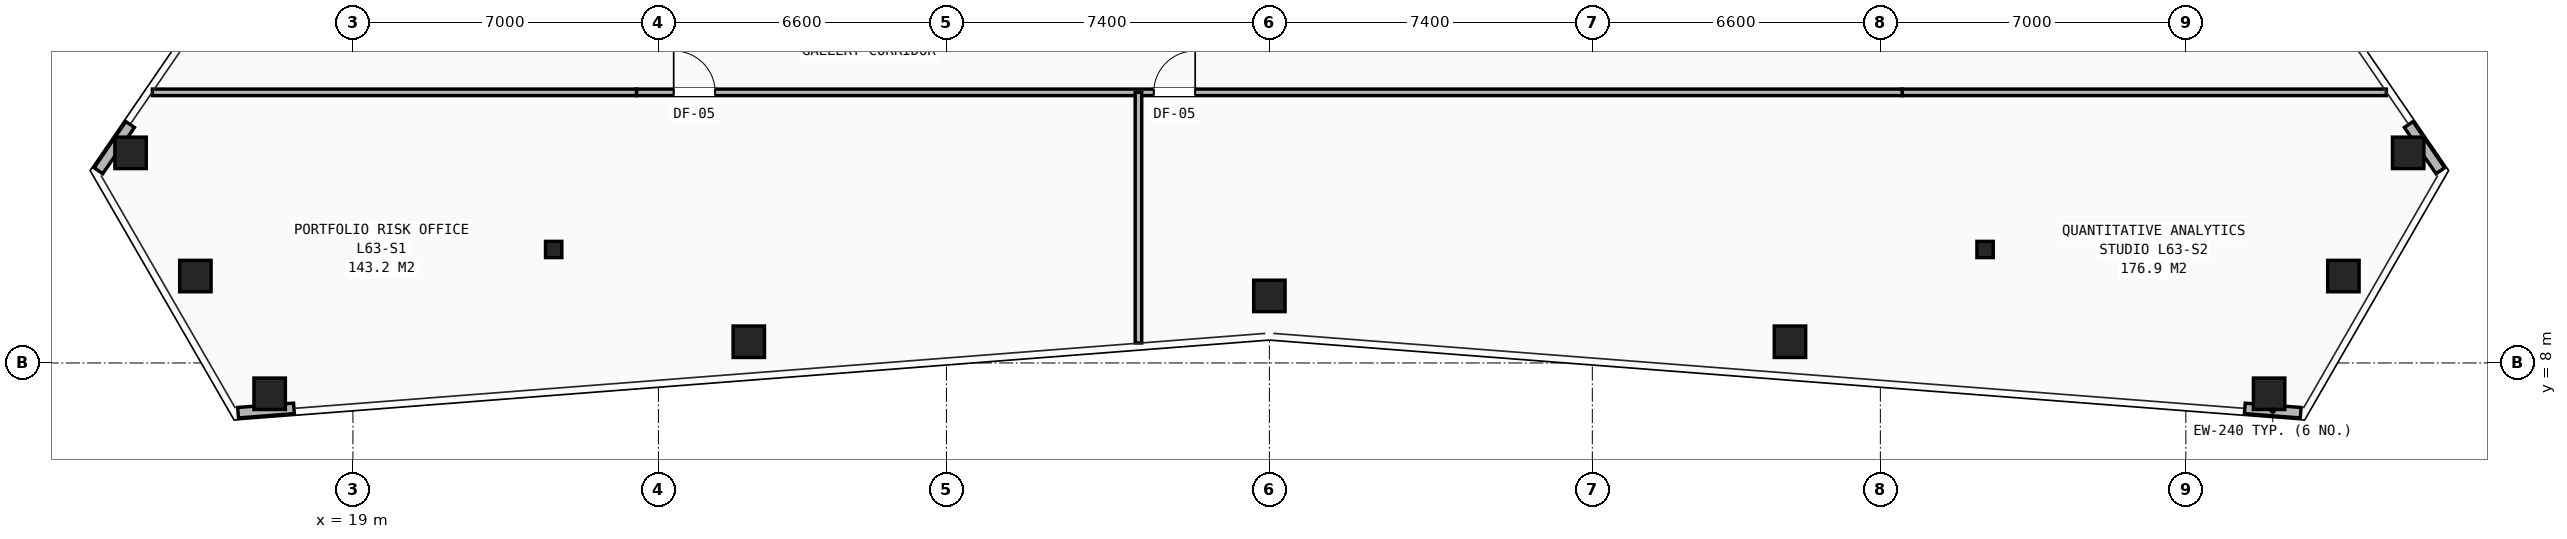
"""IFC4 building model, lengths in metres.
Left out: names, types, materials, properties, quantities, classifications, styles, units other than length and angle.
Written with IfcOpenShell. Run it as: python <this file> out.ifc"""

import sys

from ifc_helpers import new_model, si_unit, direction, frame, frame_2d, origin, origin_2d, place, context, subcontext, project, spatial, rectangle, hollow_rectangle, i_section, extrude, element, fill, save


model = new_model("IFC4")
c1 = context("Model", 3, precision=1e-05, world=origin(), true_north=direction((0.0, 1.0)))
c2 = subcontext(c1, "Body", "Model", "MODEL_VIEW")
j1 = project(units=[si_unit("LENGTHUNIT", "METRE"), si_unit("PLANEANGLEUNIT", "RADIAN")], contexts=[c1])
p1 = place(None, origin())
s1 = spatial("IfcSite", under=j1, at=p1, CompositionType="ELEMENT")
p2 = place(p1, origin())
s2 = spatial("IfcBuilding", under=s1, at=p2, CompositionType="ELEMENT")
p3 = place(p2, frame((0.0, 0.0, 222.4)))
s3 = spatial("IfcBuildingStorey", under=s2, at=p3, CompositionType="ELEMENT", Elevation=222.4)
for number, where, z_axis, x_axis in (
    (1, (23.6, 10.6, 0.0), (0.0, 0.0, 1.0), (1.0, 0.0, 0.0)),
    (2, (56.4, 10.6, 0.0), (0.0, 0.0, 1.0), (1.0, 0.0, 0.0)),
):
    element("IfcColumn", number, at=place(p3, frame(where, z_axis=z_axis, x_axis=x_axis)), inside=s3, PredefinedType="COLUMN", context=c2, shape_type="SweptSolid", body=[
        extrude(i_section(OverallWidth=0.374, OverallDepth=0.372, WebThickness=0.016, FlangeThickness=0.026, at=origin_2d()), origin(), (0.0, 0.0, 1.0), 3.5),
    ])
for number, where, z_axis, x_axis in (
    (3, (13.905, 12.814, 0.0), (0.0, 0.0, 1.0), (1.0, 0.0, 0.0)),
    (4, (15.39, 9.991, 0.0), (0.0, 0.0, 1.0), (1.0, 0.0, 0.0)),
    (5, (17.092, 7.294, 0.0), (0.0, 0.0, 1.0), (1.0, 0.0, 0.0)),
    (6, (28.071, 8.486, 0.0), (0.0, 0.0, 1.0), (1.0, 0.0, 0.0)),
    (7, (40.0, 9.537, 0.0), (0.0, 0.0, 1.0), (1.0, 0.0, 0.0)),
    (8, (51.929, 8.486, 0.0), (0.0, 0.0, 1.0), (1.0, 0.0, 0.0)),
    (9, (62.908, 7.294, 0.0), (0.0, 0.0, 1.0), (1.0, 0.0, 0.0)),
    (10, (64.61, 9.991, 0.0), (0.0, 0.0, 1.0), (1.0, 0.0, 0.0)),
    (11, (66.095, 12.814, 0.0), (0.0, 0.0, 1.0), (1.0, 0.0, 0.0)),
):
    element("IfcColumn", number, at=place(p3, frame(where, z_axis=z_axis, x_axis=x_axis)), inside=s3, PredefinedType="COLUMN", context=c2, shape_type="SweptSolid", body=[
        extrude(hollow_rectangle(XDim=0.72, YDim=0.72, WallThickness=0.05, at=origin_2d()), origin(), (0.0, 0.0, 1.0), 3.5),
    ])
p4 = place(p3, frame((13.894, 13.463, 0.0), z_axis=(0.0, 0.0, 1.0), x_axis=(-0.565269764291, -0.824906111978, 0.0)))
e12 = element("IfcWall", 12, at=p4, inside=s3, PredefinedType="SHEAR", context=c2, shape_type="SweptSolid", body=[
    extrude(rectangle(XDim=1.284, YDim=0.24, at=frame_2d((0.642, 0.0))), origin(), (0.0, 0.0, 1.0), 2.623),
])
for number, where, z_axis, x_axis in (
    (13, (16.368, 6.861, 0.0), (0.0, 0.0, 1.0), (0.997, 0.077, 0.0)),
    (14, (62.351, 6.96, 0.0), (0.0, 0.0, 1.0), (0.997, -0.077, 0.0)),
):
    element("IfcWall", number, at=place(p3, frame(where, z_axis=z_axis, x_axis=x_axis)), inside=s3, PredefinedType="SHEAR", context=c2, shape_type="SweptSolid", body=[
        extrude(rectangle(XDim=1.285, YDim=0.24, at=frame_2d((0.642, 0.0))), origin(), (0.0, 0.0, 1.0), 2.623),
    ])
p5 = place(p3, frame((66.832, 12.404, 0.0), z_axis=(0.0, 0.0, 1.0), x_axis=(-0.565269764291, 0.824906111978, 0.0)))
e15 = element("IfcWall", 15, at=p5, inside=s3, PredefinedType="SHEAR", context=c2, shape_type="SweptSolid", body=[
    extrude(rectangle(XDim=1.284, YDim=0.24, at=frame_2d((0.642, 0.0))), origin(), (0.0, 0.0, 1.0), 2.623),
])
for number, where, z_axis, x_axis in (
    (16, (14.405, 14.2, 0.0), (0.0, 0.0, 1.0), (1.0, 0.0, 0.0)),
    (17, (54.5, 14.2, 0.0), (0.0, 0.0, 1.0), (1.0, 0.0, 0.0)),
):
    element("IfcWall", number, at=place(p3, frame(where, z_axis=z_axis, x_axis=x_axis)), inside=s3, PredefinedType="PARTITIONING", context=c2, shape_type="SweptSolid", body=[
        extrude(rectangle(XDim=11.095, YDim=0.15, at=frame_2d((5.548, 0.0))), origin(), (0.0, 0.0, 1.0), 2.265),
    ])
p6 = place(p3, frame((25.5, 14.2, 0.0), z_axis=(0.0, 0.0, 1.0), x_axis=(1.0, 0.0, 0.0)))
e18 = element("IfcWall", 18, at=p6, inside=s3, PredefinedType="PARTITIONING", context=c2, shape_type="SweptSolid", body=[
    extrude(rectangle(XDim=29.0, YDim=0.15, at=frame_2d((14.5, 0.0))), origin(), (0.0, 0.0, 1.0), 2.265),
])
p7 = place(p6, frame((0.85, 0.0, 0.0)))
e19 = element("IfcOpeningElement", 19, at=p7, cuts=e18, PredefinedType="OPENING", context=c2, shape_type="SweptSolid", body=[
    extrude(rectangle(XDim=0.95, YDim=2.1, at=frame_2d((0.475, 1.05))), frame((0.0, 0.085, 0.0), z_axis=(0.0, -1.0, 0.0), x_axis=(1.0, 0.0, 0.0)), (0.0, 0.0, 1.0), 0.17),
])
p8 = place(p6, frame((11.85, 0.0, 0.0)))
e20 = element("IfcOpeningElement", 20, at=p8, cuts=e18, PredefinedType="OPENING", context=c2, shape_type="SweptSolid", body=[
    extrude(rectangle(XDim=0.95, YDim=2.1, at=frame_2d((0.475, 1.05))), frame((0.0, 0.085, 0.0), z_axis=(0.0, -1.0, 0.0), x_axis=(1.0, 0.0, 0.0)), (0.0, 0.0, 1.0), 0.17),
])
p9 = place(p3, frame((37.0, 8.458, 0.0), z_axis=(0.0, 0.0, 1.0), x_axis=(0.0, 1.0, 0.0)))
e21 = element("IfcWall", 21, at=p9, inside=s3, PredefinedType="PARTITIONING", context=c2, shape_type="SweptSolid", body=[
    extrude(rectangle(XDim=5.741, YDim=0.15, at=frame_2d((2.871, 0.0))), origin(), (0.0, 0.0, 1.0), 2.265),
])
p10 = place(p7, origin())
e22 = element("IfcDoor", 22, at=p10, inside=s3, OperationType="SINGLE_SWING_LEFT", PredefinedType="DOOR", context=c2, shape_type="SweptSolid", body=[
    extrude(rectangle(XDim=0.95, YDim=2.1, at=frame_2d((0.475, 1.05))), frame((0.0, 0.025, 0.0), z_axis=(0.0, -1.0, 0.0), x_axis=(1.0, 0.0, 0.0)), (0.0, 0.0, 1.0), 0.05),
])
fill(e19, e22)
p11 = place(p8, origin())
e23 = element("IfcDoor", 23, at=p11, inside=s3, OperationType="SINGLE_SWING_RIGHT", PredefinedType="DOOR", context=c2, shape_type="SweptSolid", body=[
    extrude(rectangle(XDim=0.95, YDim=2.1, at=frame_2d((0.475, 1.05))), frame((0.0, 0.025, 0.0), z_axis=(0.0, -1.0, 0.0), x_axis=(1.0, 0.0, 0.0)), (0.0, 0.0, 1.0), 0.05),
])
fill(e20, e23)
save(model, sys.argv[1])
